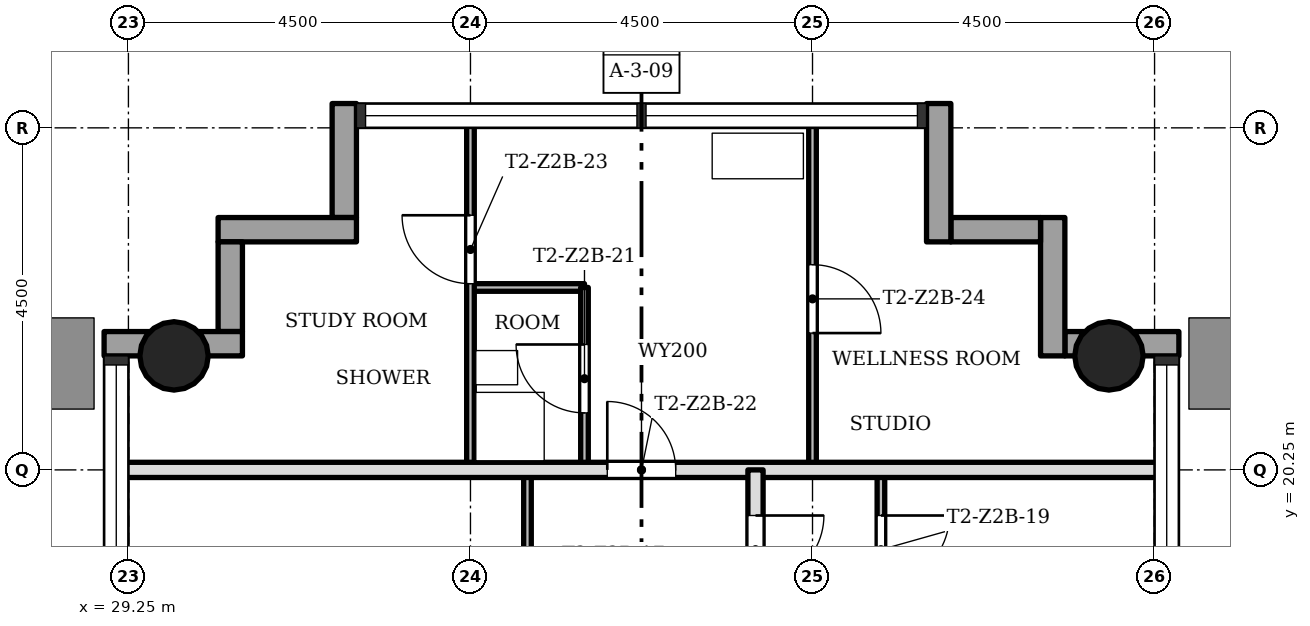
"""IFC4 building model, lengths in metres.
Left out: names, types, materials, properties, quantities, classifications, styles, units other than length and angle.
Written with IfcOpenShell. Run it as: python <this file> out.ifc"""

import sys

from ifc_helpers import new_model, si_unit, direction, frame, frame_2d, origin, origin_2d, place, context, subcontext, project, spatial, rectangle, hollow_circle, extrude, element, fill, save


model = new_model("IFC4")
c1 = context("Model", 3, precision=1e-05, world=origin(), true_north=direction((0.0, 1.0)))
c2 = subcontext(c1, "Body", "Model", "MODEL_VIEW")
j1 = project(units=[si_unit("LENGTHUNIT", "METRE"), si_unit("PLANEANGLEUNIT", "RADIAN")], contexts=[c1])
p1 = place(None, origin())
s1 = spatial("IfcSite", under=j1, at=p1, CompositionType="ELEMENT")
p2 = place(p1, origin())
s2 = spatial("IfcBuilding", under=s1, at=p2, CompositionType="ELEMENT")
p3 = place(p2, frame((0.0, 0.0, 80.0)))
s3 = spatial("IfcBuildingStorey", under=s2, at=p3, CompositionType="ELEMENT", Elevation=80.0)
for number, where, z_axis, x_axis in (
    (1, (42.15, 21.75, 0.0), (0.0, 0.0, 1.0), (1.0, 0.0, 0.0)),
    (2, (29.85, 21.75, 0.0), (0.0, 0.0, 1.0), (1.0, 0.0, 0.0)),
):
    element("IfcColumn", number, at=place(p3, frame(where, z_axis=z_axis, x_axis=x_axis)), inside=s3, PredefinedType="COLUMN", context=c2, shape_type="SweptSolid", body=[
        extrude(hollow_circle(Radius=0.45, WallThickness=0.032, at=origin_2d()), origin(), (0.0, 0.0, 1.0), 3.4),
    ])
p4 = place(p3, frame((43.07, 21.91, -0.3), z_axis=(0.0, 0.0, 1.0), x_axis=(-1.0, 0.0, 0.0)))
e3 = element("IfcWall", 3, at=p4, inside=s3, PredefinedType="STANDARD", context=c2, shape_type="SweptSolid", body=[
    extrude(rectangle(XDim=1.5, YDim=0.32, at=frame_2d((0.75, 0.0))), origin(), (0.0, 0.0, 1.0), 3.4),
])
p5 = place(p3, frame((41.41, 21.75, -0.3), z_axis=(0.0, 0.0, 1.0), x_axis=(0.0, 1.0, 0.0)))
e4 = element("IfcWall", 4, at=p5, inside=s3, PredefinedType="STANDARD", context=c2, shape_type="SweptSolid", body=[
    extrude(rectangle(XDim=1.82, YDim=0.32, at=frame_2d((0.91, 0.0))), origin(), (0.0, 0.0, 1.0), 3.4),
])
p6 = place(p3, frame((41.25, 23.41, -0.3), z_axis=(0.0, 0.0, 1.0), x_axis=(-1.0, 0.0, 0.0)))
e5 = element("IfcWall", 5, at=p6, inside=s3, PredefinedType="STANDARD", context=c2, shape_type="SweptSolid", body=[
    extrude(rectangle(XDim=1.18, YDim=0.32, at=frame_2d((0.59, 0.0))), origin(), (0.0, 0.0, 1.0), 3.4),
])
p7 = place(p3, frame((39.91, 23.25, -0.3), z_axis=(0.0, 0.0, 1.0), x_axis=(0.0, 1.0, 0.0)))
e6 = element("IfcWall", 6, at=p7, inside=s3, PredefinedType="STANDARD", context=c2, shape_type="SweptSolid", body=[
    extrude(rectangle(XDim=1.82, YDim=0.32, at=frame_2d((0.91, 0.0))), origin(), (0.0, 0.0, 1.0), 3.4),
])
p8 = place(p3, frame((32.09, 25.07, -0.3), z_axis=(0.0, 0.0, 1.0), x_axis=(0.0, -1.0, 0.0)))
e7 = element("IfcWall", 7, at=p8, inside=s3, PredefinedType="STANDARD", context=c2, shape_type="SweptSolid", body=[
    extrude(rectangle(XDim=1.5, YDim=0.32, at=frame_2d((0.75, 0.0))), origin(), (0.0, 0.0, 1.0), 3.4),
])
p9 = place(p3, frame((32.25, 23.41, -0.3), z_axis=(0.0, 0.0, 1.0), x_axis=(-1.0, 0.0, 0.0)))
e8 = element("IfcWall", 8, at=p9, inside=s3, PredefinedType="STANDARD", context=c2, shape_type="SweptSolid", body=[
    extrude(rectangle(XDim=1.82, YDim=0.32, at=frame_2d((0.91, 0.0))), origin(), (0.0, 0.0, 1.0), 3.4),
])
p10 = place(p3, frame((30.59, 23.25, -0.3), z_axis=(0.0, 0.0, 1.0), x_axis=(0.0, -1.0, 0.0)))
e9 = element("IfcWall", 9, at=p10, inside=s3, PredefinedType="STANDARD", context=c2, shape_type="SweptSolid", body=[
    extrude(rectangle(XDim=1.18, YDim=0.32, at=frame_2d((0.59, 0.0))), origin(), (0.0, 0.0, 1.0), 3.4),
])
p11 = place(p3, frame((30.75, 21.91, -0.3), z_axis=(0.0, 0.0, 1.0), x_axis=(-1.0, 0.0, 0.0)))
e10 = element("IfcWall", 10, at=p11, inside=s3, PredefinedType="STANDARD", context=c2, shape_type="SweptSolid", body=[
    extrude(rectangle(XDim=1.82, YDim=0.32, at=frame_2d((0.91, 0.0))), origin(), (0.0, 0.0, 1.0), 3.4),
])
p12 = place(p3, frame((42.85, 20.25, 0.0), z_axis=(0.0, 0.0, 1.0), x_axis=(-1.0, 0.0, 0.0)))
e11 = element("IfcWall", 11, at=p12, inside=s3, PredefinedType="SOLIDWALL", context=c2, shape_type="SweptSolid", body=[
    extrude(rectangle(XDim=13.7, YDim=0.2, at=frame_2d((6.85, 0.0))), origin(), (0.0, 0.0, 1.0), 3.0),
])
p13 = place(p12, frame((6.4, 0.0, 0.0)))
e12 = element("IfcOpeningElement", 12, at=p13, cuts=e11, PredefinedType="OPENING", context=c2, shape_type="SweptSolid", body=[
    extrude(rectangle(XDim=0.9, YDim=2.1, at=frame_2d((0.45, 1.05))), frame((0.0, 0.11, 0.0), z_axis=(0.0, -1.0, 0.0), x_axis=(1.0, 0.0, 0.0)), (0.0, 0.0, 1.0), 0.22),
])
p14 = place(p3, frame((35.25, 22.65, 0.0), z_axis=(0.0, 0.0, 1.0), x_axis=(-1.0, 0.0, 0.0)))
e13 = element("IfcWall", 13, at=p14, inside=s3, PredefinedType="PARTITIONING", context=c2, shape_type="SweptSolid", body=[
    extrude(rectangle(XDim=1.5, YDim=0.1, at=frame_2d((0.75, 0.0))), origin(), (0.0, 0.0, 1.0), 3.0),
])
p15 = place(p3, frame((39.15, 15.75, 0.0), z_axis=(0.0, 0.0, 1.0), x_axis=(0.0, 1.0, 0.0)))
e14 = element("IfcWall", 14, at=p15, inside=s3, PredefinedType="PARTITIONING", context=c2, shape_type="SweptSolid", body=[
    extrude(rectangle(XDim=4.5, YDim=0.1, at=frame_2d((2.25, 0.0))), origin(), (0.0, 0.0, 1.0), 3.0),
])
p16 = place(p15, frame((3.0, 0.0, 0.0)))
e15 = element("IfcOpeningElement", 15, at=p16, cuts=e14, PredefinedType="OPENING", context=c2, shape_type="SweptSolid", body=[
    extrude(rectangle(XDim=0.9, YDim=2.1, at=frame_2d((0.45, 1.05))), frame((0.0, 0.06, 0.0), z_axis=(0.0, -1.0, 0.0), x_axis=(1.0, 0.0, 0.0)), (0.0, 0.0, 1.0), 0.12),
])
p17 = place(p3, frame((38.25, 20.25, 0.0), z_axis=(0.0, 0.0, 1.0), x_axis=(0.0, 1.0, 0.0)))
e16 = element("IfcWall", 16, at=p17, inside=s3, PredefinedType="PARTITIONING", context=c2, shape_type="SweptSolid", body=[
    extrude(rectangle(XDim=4.6, YDim=0.1, at=frame_2d((2.3, 0.0))), origin(), (0.0, 0.0, 1.0), 3.0),
])
p18 = place(p17, frame((1.8, 0.0, 0.0)))
e17 = element("IfcOpeningElement", 17, at=p18, cuts=e16, PredefinedType="OPENING", context=c2, shape_type="SweptSolid", body=[
    extrude(rectangle(XDim=0.9, YDim=2.1, at=frame_2d((0.45, 1.05))), frame((0.0, 0.06, 0.0), z_axis=(0.0, -1.0, 0.0), x_axis=(1.0, 0.0, 0.0)), (0.0, 0.0, 1.0), 0.12),
])
p19 = place(p3, frame((37.5, 15.75, 0.0), z_axis=(0.0, 0.0, 1.0), x_axis=(0.0, 1.0, 0.0)))
e18 = element("IfcWall", 18, at=p19, inside=s3, PredefinedType="SOLIDWALL", context=c2, shape_type="SweptSolid", body=[
    extrude(rectangle(XDim=4.5, YDim=0.2, at=frame_2d((2.25, 0.0))), origin(), (0.0, 0.0, 1.0), 3.0),
])
p20 = place(p19, frame((3.0, 0.0, 0.0)))
e19 = element("IfcOpeningElement", 19, at=p20, cuts=e18, PredefinedType="OPENING", context=c2, shape_type="SweptSolid", body=[
    extrude(rectangle(XDim=0.9, YDim=2.1, at=frame_2d((0.45, 1.05))), frame((0.0, 0.11, 0.0), z_axis=(0.0, -1.0, 0.0), x_axis=(1.0, 0.0, 0.0)), (0.0, 0.0, 1.0), 0.22),
])
p21 = place(p3, frame((35.25, 20.25, 0.0), z_axis=(0.0, 0.0, 1.0), x_axis=(0.0, 1.0, 0.0)))
e20 = element("IfcWall", 20, at=p21, inside=s3, PredefinedType="PARTITIONING", context=c2, shape_type="SweptSolid", body=[
    extrude(rectangle(XDim=2.4, YDim=0.1, at=frame_2d((1.2, 0.0))), origin(), (0.0, 0.0, 1.0), 3.0),
])
p22 = place(p21, frame((0.75, 0.0, 0.0)))
e21 = element("IfcOpeningElement", 21, at=p22, cuts=e20, PredefinedType="OPENING", context=c2, shape_type="SweptSolid", body=[
    extrude(rectangle(XDim=0.9, YDim=2.1, at=frame_2d((0.45, 1.05))), frame((0.0, 0.06, 0.0), z_axis=(0.0, -1.0, 0.0), x_axis=(1.0, 0.0, 0.0)), (0.0, 0.0, 1.0), 0.12),
])
p23 = place(p3, frame((34.5, 15.75, 0.0), z_axis=(0.0, 0.0, 1.0), x_axis=(0.0, 1.0, 0.0)))
e22 = element("IfcWall", 22, at=p23, inside=s3, PredefinedType="PARTITIONING", context=c2, shape_type="SweptSolid", body=[
    extrude(rectangle(XDim=4.5, YDim=0.1, at=frame_2d((2.25, 0.0))), origin(), (0.0, 0.0, 1.0), 3.0),
])
p24 = place(p23, frame((1.8, 0.0, 0.0)))
e23 = element("IfcOpeningElement", 23, at=p24, cuts=e22, PredefinedType="OPENING", context=c2, shape_type="SweptSolid", body=[
    extrude(rectangle(XDim=0.9, YDim=2.1, at=frame_2d((0.45, 1.05))), frame((0.0, 0.06, 0.0), z_axis=(0.0, -1.0, 0.0), x_axis=(1.0, 0.0, 0.0)), (0.0, 0.0, 1.0), 0.12),
])
p25 = place(p3, frame((33.75, 20.25, 0.0), z_axis=(0.0, 0.0, 1.0), x_axis=(0.0, 1.0, 0.0)))
e24 = element("IfcWall", 24, at=p25, inside=s3, PredefinedType="PARTITIONING", context=c2, shape_type="SweptSolid", body=[
    extrude(rectangle(XDim=4.6, YDim=0.1, at=frame_2d((2.3, 0.0))), origin(), (0.0, 0.0, 1.0), 3.0),
])
p26 = place(p25, frame((2.45, 0.0, 0.0)))
e25 = element("IfcOpeningElement", 25, at=p26, cuts=e24, PredefinedType="OPENING", context=c2, shape_type="SweptSolid", body=[
    extrude(rectangle(XDim=0.9, YDim=2.1, at=frame_2d((0.45, 1.05))), frame((0.0, 0.06, 0.0), z_axis=(0.0, -1.0, 0.0), x_axis=(1.0, 0.0, 0.0)), (0.0, 0.0, 1.0), 0.12),
])
p27 = place(p20, origin())
e26 = element("IfcDoor", 26, at=p27, inside=s3, OperationType="SINGLE_SWING_RIGHT", PredefinedType="DOOR", context=c2, shape_type="SweptSolid", body=[
    extrude(rectangle(XDim=0.9, YDim=2.1, at=frame_2d((0.45, 1.05))), frame((0.0, 0.025, 0.0), z_axis=(0.0, -1.0, 0.0), x_axis=(1.0, 0.0, 0.0)), (0.0, 0.0, 1.0), 0.05),
])
fill(e19, e26)
p28 = place(p16, origin())
e27 = element("IfcDoor", 27, at=p28, inside=s3, OperationType="SINGLE_SWING_RIGHT", PredefinedType="DOOR", context=c2, shape_type="SweptSolid", body=[
    extrude(rectangle(XDim=0.9, YDim=2.1, at=frame_2d((0.45, 1.05))), frame((0.0, 0.025, 0.0), z_axis=(0.0, -1.0, 0.0), x_axis=(1.0, 0.0, 0.0)), (0.0, 0.0, 1.0), 0.05),
])
fill(e15, e27)
p29 = place(p22, origin())
e28 = element("IfcDoor", 28, at=p29, inside=s3, OperationType="SINGLE_SWING_LEFT", PredefinedType="DOOR", context=c2, shape_type="SweptSolid", body=[
    extrude(rectangle(XDim=0.9, YDim=2.1, at=frame_2d((0.45, 1.05))), frame((0.0, 0.025, 0.0), z_axis=(0.0, -1.0, 0.0), x_axis=(1.0, 0.0, 0.0)), (0.0, 0.0, 1.0), 0.05),
])
fill(e21, e28)
p30 = place(p13, origin())
e29 = element("IfcDoor", 29, at=p30, inside=s3, OperationType="SINGLE_SWING_RIGHT", PredefinedType="DOOR", context=c2, shape_type="SweptSolid", body=[
    extrude(rectangle(XDim=0.9, YDim=2.1, at=frame_2d((0.45, 1.05))), frame((0.0, 0.025, 0.0), z_axis=(0.0, -1.0, 0.0), x_axis=(1.0, 0.0, 0.0)), (0.0, 0.0, 1.0), 0.05),
])
fill(e12, e29)
p31 = place(p26, origin())
e30 = element("IfcDoor", 30, at=p31, inside=s3, OperationType="SINGLE_SWING_LEFT", PredefinedType="DOOR", context=c2, shape_type="SweptSolid", body=[
    extrude(rectangle(XDim=0.9, YDim=2.1, at=frame_2d((0.45, 1.05))), frame((0.0, 0.025, 0.0), z_axis=(0.0, -1.0, 0.0), x_axis=(1.0, 0.0, 0.0)), (0.0, 0.0, 1.0), 0.05),
])
fill(e25, e30)
p32 = place(p18, origin())
e31 = element("IfcDoor", 31, at=p32, inside=s3, OperationType="SINGLE_SWING_LEFT", PredefinedType="DOOR", context=c2, shape_type="SweptSolid", body=[
    extrude(rectangle(XDim=0.9, YDim=2.1, at=frame_2d((0.45, 1.05))), frame((0.0, 0.025, 0.0), z_axis=(0.0, -1.0, 0.0), x_axis=(1.0, 0.0, 0.0)), (0.0, 0.0, 1.0), 0.05),
])
fill(e17, e31)
save(model, sys.argv[1])
